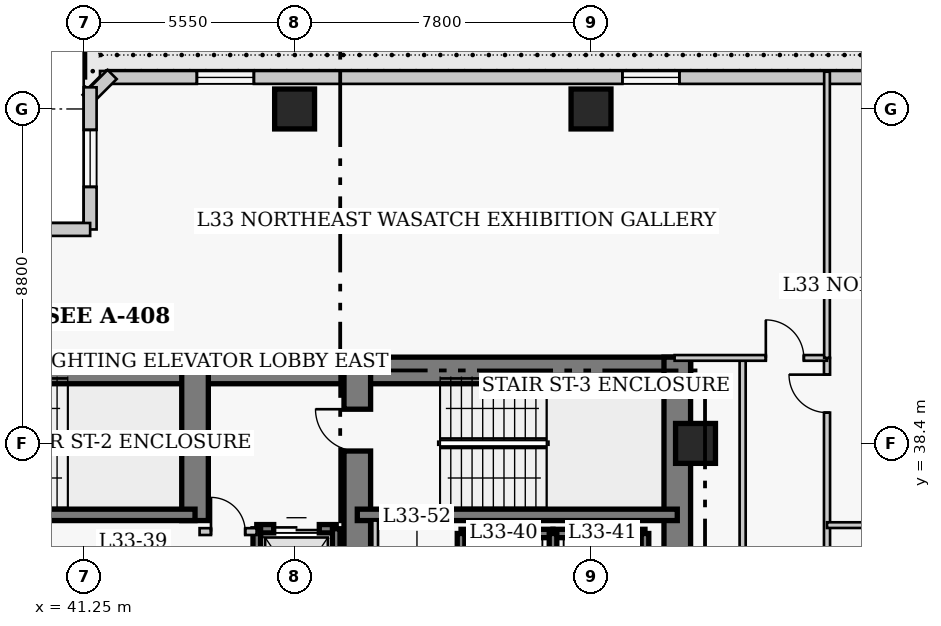
"""IFC4 building model, lengths in metres.
Left out: names, types, materials, properties, quantities, classifications, styles, units other than length and angle.
Written with IfcOpenShell. Run it as: python <this file> out.ifc"""

import sys

from ifc_helpers import new_model, si_unit, direction, frame, frame_2d, origin, origin_2d, place, context, subcontext, project, spatial, rectangle, extrude, element, fill, save


model = new_model("IFC4")
c1 = context("Model", 3, precision=1e-05, world=origin(), true_north=direction((0.0, 1.0)))
c2 = subcontext(c1, "Body", "Model", "MODEL_VIEW")
j1 = project(units=[si_unit("LENGTHUNIT", "METRE"), si_unit("PLANEANGLEUNIT", "RADIAN")], contexts=[c1])
p1 = place(None, origin())
s1 = spatial("IfcSite", under=j1, at=p1, CompositionType="ELEMENT")
p2 = place(p1, origin())
s2 = spatial("IfcBuilding", under=s1, at=p2, CompositionType="ELEMENT")
p3 = place(p2, frame((0.0, 0.0, 134.6)))
s3 = spatial("IfcBuildingStorey", under=s2, at=p3, CompositionType="ELEMENT", Elevation=134.6)
p4 = place(p3, frame((35.85, 40.32, 0.0), z_axis=(0.0, 0.0, 1.0), x_axis=(1.0, 0.0, 0.0)))
e1 = element("IfcWall", 1, at=p4, inside=s3, PredefinedType="SHEAR", context=c2, shape_type="SweptSolid", body=[
    extrude(rectangle(XDim=12.6, YDim=0.7, at=frame_2d((6.3, 0.0))), origin(), (0.0, 0.0, 1.0), 3.8),
])
p5 = place(p3, frame((48.45, 40.32, 0.0), z_axis=(0.0, 0.0, 1.0), x_axis=(1.0, 0.0, 0.0)))
e2 = element("IfcWall", 2, at=p5, inside=s3, PredefinedType="SHEAR", context=c2, shape_type="SweptSolid", body=[
    extrude(rectangle(XDim=8.77, YDim=0.7, at=frame_2d((4.385, 0.0))), origin(), (0.0, 0.0, 1.0), 3.8),
])
p6 = place(p3, frame((56.87, 27.05, 0.0), z_axis=(0.0, 0.0, 1.0), x_axis=(0.0, 1.0, 0.0)))
e3 = element("IfcWall", 3, at=p6, inside=s3, PredefinedType="SHEAR", context=c2, shape_type="SweptSolid", body=[
    extrude(rectangle(XDim=13.62, YDim=0.7, at=frame_2d((6.81, 0.0))), origin(), (0.0, 0.0, 1.0), 3.8),
])
p7 = place(p3, frame((44.18, 36.37, 0.0), z_axis=(0.0, 0.0, 1.0), x_axis=(0.0, 1.0, 0.0)))
e4 = element("IfcWall", 4, at=p7, inside=s3, PredefinedType="SHEAR", context=c2, shape_type="SweptSolid", body=[
    extrude(rectangle(XDim=3.95, YDim=0.7, at=frame_2d((1.975, 0.0))), origin(), (0.0, 0.0, 1.0), 3.8),
])
p8 = place(p3, frame((48.45, 32.4, 0.0), z_axis=(0.0, 0.0, 1.0), x_axis=(0.0, 1.0, 0.0)))
e5 = element("IfcWall", 5, at=p8, inside=s3, PredefinedType="SHEAR", context=c2, shape_type="SweptSolid", body=[
    extrude(rectangle(XDim=7.92, YDim=0.7, at=frame_2d((3.96, 0.0))), origin(), (0.0, 0.0, 1.0), 3.8),
])
p9 = place(p8, frame((5.8, 0.0, 0.0)))
e6 = element("IfcOpeningElement", 6, at=p9, cuts=e5, PredefinedType="OPENING", context=c2, shape_type="SweptSolid", body=[
    extrude(rectangle(XDim=1.1, YDim=2.15, at=frame_2d((0.55, 1.075))), frame((0.0, 0.36, 0.0), z_axis=(0.0, -1.0, 0.0), x_axis=(1.0, 0.0, 0.0)), (0.0, 0.0, 1.0), 0.72),
])
p10 = place(p3, frame((35.85, 36.52, 0.0), z_axis=(0.0, 0.0, 1.0), x_axis=(1.0, 0.0, 0.0)))
e7 = element("IfcWall", 7, at=p10, inside=s3, PredefinedType="SHEAR", context=c2, shape_type="SweptSolid", body=[
    extrude(rectangle(XDim=8.33, YDim=0.3, at=frame_2d((4.165, 0.0))), origin(), (0.0, 0.0, 1.0), 3.8),
])
p11 = place(p3, frame((48.45, 36.52, 0.0), z_axis=(0.0, 0.0, 1.0), x_axis=(1.0, 0.0, 0.0)))
e8 = element("IfcWall", 8, at=p11, inside=s3, PredefinedType="SHEAR", context=c2, shape_type="SweptSolid", body=[
    extrude(rectangle(XDim=8.42, YDim=0.3, at=frame_2d((4.21, 0.0))), origin(), (0.0, 0.0, 1.0), 3.8),
])
for number, where, z_axis, x_axis in (
    (9, (46.8, 47.2, 0.0), (0.0, 0.0, 1.0), (1.0, 0.0, 0.0)),
    (10, (54.6, 47.2, 0.0), (0.0, 0.0, 1.0), (1.0, 0.0, 0.0)),
    (11, (57.35, 38.4, 0.0), (0.0, 0.0, 1.0), (1.0, 0.0, 0.0)),
):
    element("IfcColumn", number, at=place(p3, frame(where, z_axis=z_axis, x_axis=x_axis)), inside=s3, PredefinedType="COLUMN", context=c2, shape_type="SweptSolid", body=[
        extrude(rectangle(XDim=1.05, YDim=1.05, at=origin_2d()), origin(), (0.0, 0.0, 1.0), 3.8),
    ])
p12 = place(p3, frame((68.37, 48.03, 0.0), z_axis=(0.0, 0.0, 1.0), x_axis=(-1.0, 0.0, 0.0)))
e12 = element("IfcWall", 12, at=p12, inside=s3, PredefinedType="SOLIDWALL", context=c2, shape_type="SweptSolid", body=[
    extrude(rectangle(XDim=26.69, YDim=0.34, at=frame_2d((13.345, 0.0))), origin(), (0.0, 0.0, 1.0), 3.55),
])
p13 = place(p12, frame((3.048, 0.0, 0.85)))
e13 = element("IfcOpeningElement", 13, at=p13, cuts=e12, PredefinedType="OPENING", context=c2, shape_type="SweptSolid", body=[
    extrude(rectangle(XDim=1.5, YDim=1.75, at=frame_2d((0.75, 0.875))), frame((0.0, 0.18, 0.0), z_axis=(0.0, -1.0, 0.0), x_axis=(1.0, 0.0, 0.0)), (0.0, 0.0, 1.0), 0.36),
])
p14 = place(p12, frame((11.445, 0.0, 0.85)))
e14 = element("IfcOpeningElement", 14, at=p14, cuts=e12, PredefinedType="OPENING", context=c2, shape_type="SweptSolid", body=[
    extrude(rectangle(XDim=1.5, YDim=1.75, at=frame_2d((0.75, 0.875))), frame((0.0, 0.18, 0.0), z_axis=(0.0, -1.0, 0.0), x_axis=(1.0, 0.0, 0.0)), (0.0, 0.0, 1.0), 0.36),
])
p15 = place(p12, frame((22.642, 0.0, 0.85)))
e15 = element("IfcOpeningElement", 15, at=p15, cuts=e12, PredefinedType="OPENING", context=c2, shape_type="SweptSolid", body=[
    extrude(rectangle(XDim=1.5, YDim=1.75, at=frame_2d((0.75, 0.875))), frame((0.0, 0.18, 0.0), z_axis=(0.0, -1.0, 0.0), x_axis=(1.0, 0.0, 0.0)), (0.0, 0.0, 1.0), 0.36),
])
p16 = place(p3, frame((41.999, 48.108, 0.0), z_axis=(0.0, 0.0, 1.0), x_axis=(-0.707106781187, -0.707106781187, 0.0)))
e16 = element("IfcWall", 16, at=p16, inside=s3, PredefinedType="SOLIDWALL", context=c2, shape_type="SweptSolid", body=[
    extrude(rectangle(XDim=0.929, YDim=0.34, at=frame_2d((0.464, 0.0))), origin(), (0.0, 0.0, 1.0), 3.55),
])
p17 = place(p3, frame((41.42, 47.77, 0.0), z_axis=(0.0, 0.0, 1.0), x_axis=(0.0, -1.0, 0.0)))
e17 = element("IfcWall", 17, at=p17, inside=s3, PredefinedType="SOLIDWALL", context=c2, shape_type="SweptSolid", body=[
    extrude(rectangle(XDim=3.74, YDim=0.34, at=frame_2d((1.87, 0.0))), origin(), (0.0, 0.0, 1.0), 3.55),
])
p18 = place(p17, frame((1.12, 0.0, 0.85)))
e18 = element("IfcOpeningElement", 18, at=p18, cuts=e17, PredefinedType="OPENING", context=c2, shape_type="SweptSolid", body=[
    extrude(rectangle(XDim=1.5, YDim=1.75, at=frame_2d((0.75, 0.875))), frame((0.0, 0.18, 0.0), z_axis=(0.0, -1.0, 0.0), x_axis=(1.0, 0.0, 0.0)), (0.0, 0.0, 1.0), 0.36),
])
p19 = place(p3, frame((41.42, 44.03, 0.0), z_axis=(0.0, 0.0, 1.0), x_axis=(-1.0, 0.0, 0.0)))
e19 = element("IfcWall", 19, at=p19, inside=s3, PredefinedType="SOLIDWALL", context=c2, shape_type="SweptSolid", body=[
    extrude(rectangle(XDim=4.84, YDim=0.34, at=frame_2d((2.42, 0.0))), origin(), (0.0, 0.0, 1.0), 3.55),
])
p20 = place(p19, frame((1.67, 0.0, 0.85)))
e20 = element("IfcOpeningElement", 20, at=p20, cuts=e19, PredefinedType="OPENING", context=c2, shape_type="SweptSolid", body=[
    extrude(rectangle(XDim=1.5, YDim=1.75, at=frame_2d((0.75, 0.875))), frame((0.0, 0.18, 0.0), z_axis=(0.0, -1.0, 0.0), x_axis=(1.0, 0.0, 0.0)), (0.0, 0.0, 1.0), 0.36),
])
p21 = place(p3, frame((51.18, 36.03, 0.0), z_axis=(0.0, 0.0, 1.0), x_axis=(1.0, 0.0, 0.0)))
e21 = element("IfcWall", 21, at=p21, inside=s3, PredefinedType="SHEAR", context=c2, shape_type="SweptSolid", body=[
    extrude(rectangle(XDim=2.42, YDim=0.22, at=frame_2d((1.21, 0.0))), origin(), (0.0, 0.0, 1.0), 3.8),
])
p22 = place(p3, frame((51.18, 33.17, 0.0), z_axis=(0.0, 0.0, 1.0), x_axis=(0.0, 1.0, 0.0)))
e22 = element("IfcWall", 22, at=p22, inside=s3, PredefinedType="SHEAR", context=c2, shape_type="SweptSolid", body=[
    extrude(rectangle(XDim=2.86, YDim=0.2, at=frame_2d((1.43, 0.0))), origin(), (0.0, 0.0, 1.0), 3.8),
])
p23 = place(p3, frame((53.6, 36.03, 0.0), z_axis=(0.0, 0.0, 1.0), x_axis=(1.0, 0.0, 0.0)))
e23 = element("IfcWall", 23, at=p23, inside=s3, PredefinedType="SHEAR", context=c2, shape_type="SweptSolid", body=[
    extrude(rectangle(XDim=2.42, YDim=0.22, at=frame_2d((1.21, 0.0))), origin(), (0.0, 0.0, 1.0), 3.8),
])
for number, where, z_axis, x_axis in (
    (24, (53.6, 33.17, 0.0), (0.0, 0.0, 1.0), (0.0, 1.0, 0.0)),
    (25, (56.02, 33.17, 0.0), (0.0, 0.0, 1.0), (0.0, 1.0, 0.0)),
):
    element("IfcWall", number, at=place(p3, frame(where, z_axis=z_axis, x_axis=x_axis)), inside=s3, PredefinedType="SHEAR", context=c2, shape_type="SweptSolid", body=[
        extrude(rectangle(XDim=2.86, YDim=0.2, at=frame_2d((1.43, 0.0))), origin(), (0.0, 0.0, 1.0), 3.8),
    ])
p24 = place(p3, frame((45.805, 36.155, 0.0), z_axis=(0.0, 0.0, 1.0), x_axis=(1.0, 0.0, 0.0)))
e26 = element("IfcWall", 26, at=p24, inside=s3, PredefinedType="SHEAR", context=c2, shape_type="SweptSolid", body=[
    extrude(rectangle(XDim=2.09, YDim=0.22, at=frame_2d((1.045, 0.0))), origin(), (0.0, 0.0, 1.0), 3.8),
])
p25 = place(p24, frame((0.445, 0.0, 0.0)))
e27 = element("IfcOpeningElement", 27, at=p25, cuts=e26, PredefinedType="OPENING", context=c2, shape_type="SweptSolid", body=[
    extrude(rectangle(XDim=1.2, YDim=2.15, at=frame_2d((0.6, 1.075))), frame((0.0, 0.12, 0.0), z_axis=(0.0, -1.0, 0.0), x_axis=(1.0, 0.0, 0.0)), (0.0, 0.0, 1.0), 0.24),
])
p26 = place(p3, frame((45.805, 32.65, 0.0), z_axis=(0.0, 0.0, 1.0), x_axis=(0.0, 1.0, 0.0)))
e28 = element("IfcWall", 28, at=p26, inside=s3, PredefinedType="SHEAR", context=c2, shape_type="SweptSolid", body=[
    extrude(rectangle(XDim=3.505, YDim=0.2, at=frame_2d((1.752, 0.0))), origin(), (0.0, 0.0, 1.0), 3.8),
])
p27 = place(p3, frame((47.895, 33.245, 0.0), z_axis=(0.0, 0.0, 1.0), x_axis=(0.0, 1.0, 0.0)))
e29 = element("IfcWall", 29, at=p27, inside=s3, PredefinedType="SHEAR", context=c2, shape_type="SweptSolid", body=[
    extrude(rectangle(XDim=2.91, YDim=0.2, at=frame_2d((1.455, 0.0))), origin(), (0.0, 0.0, 1.0), 3.8),
])
p28 = place(p3, frame((44.3, 36.08, 0.0), z_axis=(0.0, 0.0, 1.0), x_axis=(1.0, 0.0, 0.0)))
e30 = element("IfcWall", 30, at=p28, inside=s3, PredefinedType="PARTITIONING", context=c2, shape_type="SweptSolid", body=[
    extrude(rectangle(XDim=1.5, YDim=0.18, at=frame_2d((0.75, 0.0))), origin(), (0.0, 0.0, 1.0), 3.55),
])
p29 = place(p28, frame((0.3, 0.0, 0.0)))
e31 = element("IfcOpeningElement", 31, at=p29, cuts=e30, PredefinedType="OPENING", context=c2, shape_type="SweptSolid", body=[
    extrude(rectangle(XDim=0.9, YDim=2.15, at=frame_2d((0.45, 1.075))), frame((0.0, 0.1, 0.0), z_axis=(0.0, -1.0, 0.0), x_axis=(1.0, 0.0, 0.0)), (0.0, 0.0, 1.0), 0.2),
])
p30 = place(p3, frame((48.92, 32.75, 0.0), z_axis=(0.0, 0.0, 1.0), x_axis=(0.0, 1.0, 0.0)))
e32 = element("IfcWall", 32, at=p30, inside=s3, PredefinedType="PARTITIONING", context=c2, shape_type="SweptSolid", body=[
    extrude(rectangle(XDim=3.62, YDim=0.15, at=frame_2d((1.81, 0.0))), origin(), (0.0, 0.0, 1.0), 3.55),
])
p31 = place(p3, frame((60.81, 12.05, 0.0), z_axis=(0.0, 0.0, 1.0), x_axis=(0.0, 1.0, 0.0)))
e33 = element("IfcWall", 33, at=p31, inside=s3, PredefinedType="PARTITIONING", context=c2, shape_type="SweptSolid", body=[
    extrude(rectangle(XDim=28.6, YDim=0.16, at=frame_2d((14.3, 0.0))), origin(), (0.0, 0.0, 1.0), 3.55),
])
p32 = place(p31, frame((0.925, 0.0, 0.0)))
e34 = element("IfcOpeningElement", 34, at=p32, cuts=e33, PredefinedType="OPENING", context=c2, shape_type="SweptSolid", body=[
    extrude(rectangle(XDim=0.95, YDim=2.1, at=frame_2d((0.475, 1.05))), frame((0.0, 0.09, 0.0), z_axis=(0.0, -1.0, 0.0), x_axis=(1.0, 0.0, 0.0)), (0.0, 0.0, 1.0), 0.18),
])
p33 = place(p31, frame((20.0, 0.0, 0.0)))
e35 = element("IfcOpeningElement", 35, at=p33, cuts=e33, PredefinedType="OPENING", context=c2, shape_type="SweptSolid", body=[
    extrude(rectangle(XDim=0.95, YDim=2.1, at=frame_2d((0.475, 1.05))), frame((0.0, 0.09, 0.0), z_axis=(0.0, -1.0, 0.0), x_axis=(1.0, 0.0, 0.0)), (0.0, 0.0, 1.0), 0.18),
])
p34 = place(p31, frame((27.16, 0.0, 0.0)))
e36 = element("IfcOpeningElement", 36, at=p34, cuts=e33, PredefinedType="OPENING", context=c2, shape_type="SweptSolid", body=[
    extrude(rectangle(XDim=1.0, YDim=2.15, at=frame_2d((0.5, 1.075))), frame((0.0, 0.09, 0.0), z_axis=(0.0, -1.0, 0.0), x_axis=(1.0, 0.0, 0.0)), (0.0, 0.0, 1.0), 0.18),
])
p35 = place(p3, frame((58.59, 16.66, 0.0), z_axis=(0.0, 0.0, 1.0), x_axis=(0.0, 1.0, 0.0)))
e37 = element("IfcWall", 37, at=p35, inside=s3, PredefinedType="PARTITIONING", context=c2, shape_type="SweptSolid", body=[
    extrude(rectangle(XDim=23.99, YDim=0.16, at=frame_2d((11.995, 0.0))), origin(), (0.0, 0.0, 1.0), 3.093),
])
p36 = place(p3, frame((56.8, 40.65, 0.0), z_axis=(0.0, 0.0, 1.0), x_axis=(1.0, 0.0, 0.0)))
e38 = element("IfcWall", 38, at=p36, inside=s3, PredefinedType="PARTITIONING", context=c2, shape_type="SweptSolid", body=[
    extrude(rectangle(XDim=4.01, YDim=0.15, at=frame_2d((2.005, 0.0))), origin(), (0.0, 0.0, 1.0), 3.55),
])
p37 = place(p36, frame((2.4, 0.0, 0.0)))
e39 = element("IfcOpeningElement", 39, at=p37, cuts=e38, PredefinedType="OPENING", context=c2, shape_type="SweptSolid", body=[
    extrude(rectangle(XDim=1.0, YDim=2.15, at=frame_2d((0.5, 1.075))), frame((0.0, 0.085, 0.0), z_axis=(0.0, -1.0, 0.0), x_axis=(1.0, 0.0, 0.0)), (0.0, 0.0, 1.0), 0.17),
])
p38 = place(p3, frame((60.81, 40.65, 0.0), z_axis=(0.0, 0.0, 1.0), x_axis=(0.0, 1.0, 0.0)))
e40 = element("IfcWall", 40, at=p38, inside=s3, PredefinedType="PARTITIONING", context=c2, shape_type="SweptSolid", body=[
    extrude(rectangle(XDim=7.53, YDim=0.15, at=frame_2d((3.765, 0.0))), origin(), (0.0, 0.0, 1.0), 3.55),
])
p39 = place(p3, frame((60.81, 36.25, 0.0), z_axis=(0.0, 0.0, 1.0), x_axis=(1.0, 0.0, 0.0)))
e41 = element("IfcWall", 41, at=p39, inside=s3, PredefinedType="PARTITIONING", context=c2, shape_type="SweptSolid", body=[
    extrude(rectangle(XDim=4.29, YDim=0.15, at=frame_2d((2.145, 0.0))), origin(), (0.0, 0.0, 1.0), 3.55),
])
p40 = place(p14, origin())
e42 = element("IfcWindow", 42, at=p40, inside=s3, PartitioningType="SINGLE_PANEL", PredefinedType="WINDOW", context=c2, shape_type="SweptSolid", body=[
    extrude(rectangle(XDim=1.5, YDim=1.75, at=frame_2d((0.75, 0.875))), frame((0.0, 0.03, 0.0), z_axis=(0.0, -1.0, 0.0), x_axis=(1.0, 0.0, 0.0)), (0.0, 0.0, 1.0), 0.06),
])
fill(e14, e42)
p41 = place(p15, origin())
e43 = element("IfcWindow", 43, at=p41, inside=s3, PartitioningType="SINGLE_PANEL", PredefinedType="WINDOW", context=c2, shape_type="SweptSolid", body=[
    extrude(rectangle(XDim=1.5, YDim=1.75, at=frame_2d((0.75, 0.875))), frame((0.0, 0.03, 0.0), z_axis=(0.0, -1.0, 0.0), x_axis=(1.0, 0.0, 0.0)), (0.0, 0.0, 1.0), 0.06),
])
fill(e15, e43)
p42 = place(p18, origin())
e44 = element("IfcWindow", 44, at=p42, inside=s3, PartitioningType="SINGLE_PANEL", PredefinedType="WINDOW", context=c2, shape_type="SweptSolid", body=[
    extrude(rectangle(XDim=1.5, YDim=1.75, at=frame_2d((0.75, 0.875))), frame((0.0, 0.03, 0.0), z_axis=(0.0, -1.0, 0.0), x_axis=(1.0, 0.0, 0.0)), (0.0, 0.0, 1.0), 0.06),
])
fill(e18, e44)
p43 = place(p25, origin())
e45 = element("IfcDoor", 45, at=p43, inside=s3, OperationType="DOUBLE_DOOR_SLIDING", PredefinedType="DOOR", context=c2, shape_type="SweptSolid", body=[
    extrude(rectangle(XDim=1.2, YDim=2.15, at=frame_2d((0.6, 1.075))), frame((0.0, 0.025, 0.0), z_axis=(0.0, -1.0, 0.0), x_axis=(1.0, 0.0, 0.0)), (0.0, 0.0, 1.0), 0.05),
])
fill(e27, e45)
p44 = place(p29, origin())
e46 = element("IfcDoor", 46, at=p44, inside=s3, OperationType="SINGLE_SWING_LEFT", PredefinedType="DOOR", context=c2, shape_type="SweptSolid", body=[
    extrude(rectangle(XDim=0.9, YDim=2.15, at=frame_2d((0.45, 1.075))), frame((0.0, 0.025, 0.0), z_axis=(0.0, -1.0, 0.0), x_axis=(1.0, 0.0, 0.0)), (0.0, 0.0, 1.0), 0.05),
])
fill(e31, e46)
p45 = place(p37, origin())
e47 = element("IfcDoor", 47, at=p45, inside=s3, OperationType="SINGLE_SWING_LEFT", PredefinedType="DOOR", context=c2, shape_type="SweptSolid", body=[
    extrude(rectangle(XDim=1.0, YDim=2.15, at=frame_2d((0.5, 1.075))), frame((0.0, 0.025, 0.0), z_axis=(0.0, -1.0, 0.0), x_axis=(1.0, 0.0, 0.0)), (0.0, 0.0, 1.0), 0.05),
])
fill(e39, e47)
p46 = place(p34, origin())
e48 = element("IfcDoor", 48, at=p46, inside=s3, OperationType="SINGLE_SWING_RIGHT", PredefinedType="DOOR", context=c2, shape_type="SweptSolid", body=[
    extrude(rectangle(XDim=1.0, YDim=2.15, at=frame_2d((0.5, 1.075))), frame((0.0, 0.025, 0.0), z_axis=(0.0, -1.0, 0.0), x_axis=(1.0, 0.0, 0.0)), (0.0, 0.0, 1.0), 0.05),
])
fill(e36, e48)
p47 = place(p9, origin())
e49 = element("IfcDoor", 49, at=p47, inside=s3, OperationType="SINGLE_SWING_RIGHT", PredefinedType="DOOR", context=c2, shape_type="SweptSolid", body=[
    extrude(rectangle(XDim=1.1, YDim=2.15, at=frame_2d((0.55, 1.075))), frame((0.0, 0.025, 0.0), z_axis=(0.0, -1.0, 0.0), x_axis=(1.0, 0.0, 0.0)), (0.0, 0.0, 1.0), 0.05),
])
fill(e6, e49)
save(model, sys.argv[1])
